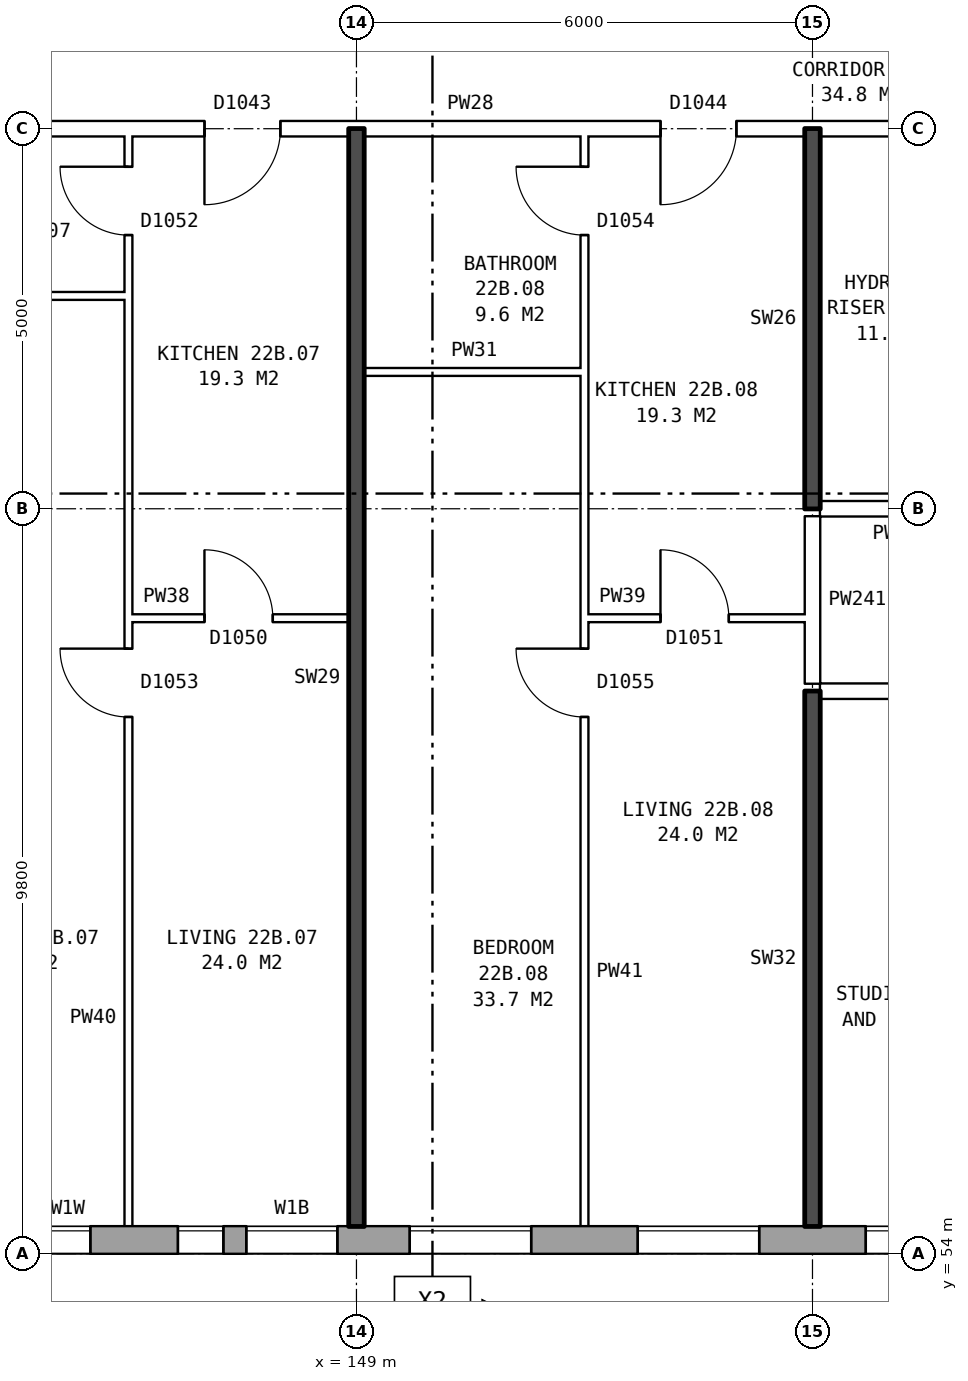
"""IFC4 building model, lengths in metres.
Left out: names, types, materials, properties, quantities, classifications, styles, units other than length and angle.
Written with IfcOpenShell. Run it as: python <this file> out.ifc"""

import sys

from ifc_helpers import new_model, si_unit, direction, frame, frame_2d, origin, place, context, subcontext, project, spatial, rectangle, extrude, element, fill, save


model = new_model("IFC4")
c1 = context("Model", 3, precision=1e-05, world=origin(), true_north=direction((0.0, 1.0)))
c2 = subcontext(c1, "Body", "Model", "MODEL_VIEW")
j1 = project(units=[si_unit("LENGTHUNIT", "METRE"), si_unit("PLANEANGLEUNIT", "RADIAN")], contexts=[c1])
p1 = place(None, origin())
s1 = spatial("IfcSite", under=j1, at=p1, CompositionType="ELEMENT")
p2 = place(p1, origin())
s2 = spatial("IfcBuilding", under=s1, at=p2, CompositionType="ELEMENT")
p3 = place(p2, frame((0.0, 0.0, 80.9)))
s3 = spatial("IfcBuildingStorey", under=s2, at=p3, CompositionType="ELEMENT", Elevation=80.9)
p4 = place(p3, frame((134.075, 54.18, 0.0), z_axis=(0.0, 0.0, 1.0), x_axis=(1.0, 0.0, 0.0)))
e1 = element("IfcWall", 1, at=p4, inside=s3, PredefinedType="STANDARD", context=c2, shape_type="SweptSolid", body=[
    extrude(rectangle(XDim=38.101, YDim=0.36, at=frame_2d((19.05, 0.0))), origin(), (0.0, 0.0, 1.0), 2.85),
])
p5 = place(p4, frame((0.625, 0.0, 0.8)))
e2 = element("IfcOpeningElement", 2, at=p5, cuts=e1, PredefinedType="OPENING", context=c2, shape_type="SweptSolid", body=[
    extrude(rectangle(XDim=1.6, YDim=1.8, at=frame_2d((0.8, 0.9))), frame((0.0, 0.19, 0.0), z_axis=(0.0, -1.0, 0.0), x_axis=(1.0, 0.0, 0.0)), (0.0, 0.0, 1.0), 0.38),
])
p6 = place(p4, frame((3.625, 0.0, 0.8)))
e3 = element("IfcOpeningElement", 3, at=p6, cuts=e1, PredefinedType="OPENING", context=c2, shape_type="SweptSolid", body=[
    extrude(rectangle(XDim=1.6, YDim=1.8, at=frame_2d((0.8, 0.9))), frame((0.0, 0.19, 0.0), z_axis=(0.0, -1.0, 0.0), x_axis=(1.0, 0.0, 0.0)), (0.0, 0.0, 1.0), 0.38),
])
p7 = place(p4, frame((6.625, 0.0, 0.8)))
e4 = element("IfcOpeningElement", 4, at=p7, cuts=e1, PredefinedType="OPENING", context=c2, shape_type="SweptSolid", body=[
    extrude(rectangle(XDim=1.6, YDim=1.8, at=frame_2d((0.8, 0.9))), frame((0.0, 0.19, 0.0), z_axis=(0.0, -1.0, 0.0), x_axis=(1.0, 0.0, 0.0)), (0.0, 0.0, 1.0), 0.38),
])
p8 = place(p4, frame((9.125, 0.0, 0.8)))
e5 = element("IfcOpeningElement", 5, at=p8, cuts=e1, PredefinedType="OPENING", context=c2, shape_type="SweptSolid", body=[
    extrude(rectangle(XDim=1.4, YDim=1.8, at=frame_2d((0.7, 0.9))), frame((0.0, 0.19, 0.0), z_axis=(0.0, -1.0, 0.0), x_axis=(1.0, 0.0, 0.0)), (0.0, 0.0, 1.0), 0.38),
])
p9 = place(p4, frame((12.575, 0.0, 0.8)))
e6 = element("IfcOpeningElement", 6, at=p9, cuts=e1, PredefinedType="OPENING", context=c2, shape_type="SweptSolid", body=[
    extrude(rectangle(XDim=0.6, YDim=0.9, at=frame_2d((0.3, 0.45))), frame((0.0, 0.19, 0.0), z_axis=(0.0, -1.0, 0.0), x_axis=(1.0, 0.0, 0.0)), (0.0, 0.0, 1.0), 0.38),
])
p10 = place(p4, frame((15.625, 0.0, 0.8)))
e7 = element("IfcOpeningElement", 7, at=p10, cuts=e1, PredefinedType="OPENING", context=c2, shape_type="SweptSolid", body=[
    extrude(rectangle(XDim=1.6, YDim=1.8, at=frame_2d((0.8, 0.9))), frame((0.0, 0.19, 0.0), z_axis=(0.0, -1.0, 0.0), x_axis=(1.0, 0.0, 0.0)), (0.0, 0.0, 1.0), 0.38),
])
p11 = place(p4, frame((18.625, 0.0, 0.8)))
e8 = element("IfcOpeningElement", 8, at=p11, cuts=e1, PredefinedType="OPENING", context=c2, shape_type="SweptSolid", body=[
    extrude(rectangle(XDim=1.6, YDim=1.8, at=frame_2d((0.8, 0.9))), frame((0.0, 0.19, 0.0), z_axis=(0.0, -1.0, 0.0), x_axis=(1.0, 0.0, 0.0)), (0.0, 0.0, 1.0), 0.38),
])
p12 = place(p4, frame((21.625, 0.0, 0.8)))
e9 = element("IfcOpeningElement", 9, at=p12, cuts=e1, PredefinedType="OPENING", context=c2, shape_type="SweptSolid", body=[
    extrude(rectangle(XDim=1.6, YDim=1.8, at=frame_2d((0.8, 0.9))), frame((0.0, 0.19, 0.0), z_axis=(0.0, -1.0, 0.0), x_axis=(1.0, 0.0, 0.0)), (0.0, 0.0, 1.0), 0.38),
])
p13 = place(p4, frame((23.525, 0.0, 0.8)))
e10 = element("IfcOpeningElement", 10, at=p13, cuts=e1, PredefinedType="OPENING", context=c2, shape_type="SweptSolid", body=[
    extrude(rectangle(XDim=1.0, YDim=1.8, at=frame_2d((0.5, 0.9))), frame((0.0, 0.19, 0.0), z_axis=(0.0, -1.0, 0.0), x_axis=(1.0, 0.0, 0.0)), (0.0, 0.0, 1.0), 0.38),
])
p14 = place(p4, frame((27.625, 0.0, 0.8)))
e11 = element("IfcOpeningElement", 11, at=p14, cuts=e1, PredefinedType="OPENING", context=c2, shape_type="SweptSolid", body=[
    extrude(rectangle(XDim=1.6, YDim=1.8, at=frame_2d((0.8, 0.9))), frame((0.0, 0.19, 0.0), z_axis=(0.0, -1.0, 0.0), x_axis=(1.0, 0.0, 0.0)), (0.0, 0.0, 1.0), 0.38),
])
p15 = place(p4, frame((30.625, 0.0, 0.8)))
e12 = element("IfcOpeningElement", 12, at=p15, cuts=e1, PredefinedType="OPENING", context=c2, shape_type="SweptSolid", body=[
    extrude(rectangle(XDim=1.6, YDim=1.8, at=frame_2d((0.8, 0.9))), frame((0.0, 0.19, 0.0), z_axis=(0.0, -1.0, 0.0), x_axis=(1.0, 0.0, 0.0)), (0.0, 0.0, 1.0), 0.38),
])
p16 = place(p4, frame((33.625, 0.0, 0.8)))
e13 = element("IfcOpeningElement", 13, at=p16, cuts=e1, PredefinedType="OPENING", context=c2, shape_type="SweptSolid", body=[
    extrude(rectangle(XDim=1.6, YDim=1.8, at=frame_2d((0.8, 0.9))), frame((0.0, 0.19, 0.0), z_axis=(0.0, -1.0, 0.0), x_axis=(1.0, 0.0, 0.0)), (0.0, 0.0, 1.0), 0.38),
])
p17 = place(p4, frame((10.825, 0.0, 1.7)))
e14 = element("IfcOpeningElement", 14, at=p17, cuts=e1, PredefinedType="OPENING", context=c2, shape_type="SweptSolid", body=[
    extrude(rectangle(XDim=0.6, YDim=0.9, at=frame_2d((0.3, 0.45))), frame((0.0, 0.19, 0.0), z_axis=(0.0, -1.0, 0.0), x_axis=(1.0, 0.0, 0.0)), (0.0, 0.0, 1.0), 0.38),
])
p18 = place(p4, frame((13.475, 0.0, 0.8)))
e15 = element("IfcOpeningElement", 15, at=p18, cuts=e1, PredefinedType="OPENING", context=c2, shape_type="SweptSolid", body=[
    extrude(rectangle(XDim=1.2, YDim=1.8, at=frame_2d((0.6, 0.9))), frame((0.0, 0.19, 0.0), z_axis=(0.0, -1.0, 0.0), x_axis=(1.0, 0.0, 0.0)), (0.0, 0.0, 1.0), 0.38),
])
p19 = place(p4, frame((24.825, 0.0, 0.8)))
e16 = element("IfcOpeningElement", 16, at=p19, cuts=e1, PredefinedType="OPENING", context=c2, shape_type="SweptSolid", body=[
    extrude(rectangle(XDim=0.6, YDim=0.9, at=frame_2d((0.3, 0.45))), frame((0.0, 0.19, 0.0), z_axis=(0.0, -1.0, 0.0), x_axis=(1.0, 0.0, 0.0)), (0.0, 0.0, 1.0), 0.38),
])
p20 = place(p3, frame((155.1, 61.4, 0.0), z_axis=(0.0, 0.0, 1.0), x_axis=(1.0, 0.0, 0.0)))
e17 = element("IfcWall", 17, at=p20, inside=s3, PredefinedType="PARTITIONING", context=c2, shape_type="SweptSolid", body=[
    extrude(rectangle(XDim=19.79, YDim=0.2, at=frame_2d((9.895, 0.0))), origin(), (0.0, 0.0, 1.0), 2.85),
])
p21 = place(p20, frame((1.45, 0.0, 0.0)))
e18 = element("IfcOpeningElement", 18, at=p21, cuts=e17, PredefinedType="OPENING", context=c2, shape_type="SweptSolid", body=[
    extrude(rectangle(XDim=1.0, YDim=2.1, at=frame_2d((0.5, 1.05))), frame((0.0, 0.11, 0.0), z_axis=(0.0, -1.0, 0.0), x_axis=(1.0, 0.0, 0.0)), (0.0, 0.0, 1.0), 0.22),
])
p22 = place(p20, frame((7.4, 0.0, 0.0)))
e19 = element("IfcOpeningElement", 19, at=p22, cuts=e17, PredefinedType="OPENING", context=c2, shape_type="SweptSolid", body=[
    extrude(rectangle(XDim=1.0, YDim=2.1, at=frame_2d((0.5, 1.05))), frame((0.0, 0.11, 0.0), z_axis=(0.0, -1.0, 0.0), x_axis=(1.0, 0.0, 0.0)), (0.0, 0.0, 1.0), 0.22),
])
p23 = place(p20, frame((13.2, 0.0, 0.0)))
e20 = element("IfcOpeningElement", 20, at=p23, cuts=e17, PredefinedType="OPENING", context=c2, shape_type="SweptSolid", body=[
    extrude(rectangle(XDim=1.0, YDim=2.1, at=frame_2d((0.5, 1.05))), frame((0.0, 0.11, 0.0), z_axis=(0.0, -1.0, 0.0), x_axis=(1.0, 0.0, 0.0)), (0.0, 0.0, 1.0), 0.22),
])
p24 = place(p3, frame((146.0, 62.36, 0.0), z_axis=(0.0, 0.0, 1.0), x_axis=(1.0, 0.0, 0.0)))
e21 = element("IfcWall", 21, at=p24, inside=s3, PredefinedType="PARTITIONING", context=c2, shape_type="SweptSolid", body=[
    extrude(rectangle(XDim=2.9, YDim=0.1, at=frame_2d((1.45, 0.0))), origin(), (0.0, 0.0, 1.0), 2.85),
])
p25 = place(p24, frame((1.0, 0.0, 0.0)))
e22 = element("IfcOpeningElement", 22, at=p25, cuts=e21, PredefinedType="OPENING", context=c2, shape_type="SweptSolid", body=[
    extrude(rectangle(XDim=0.9, YDim=2.1, at=frame_2d((0.45, 1.05))), frame((0.0, 0.06, 0.0), z_axis=(0.0, -1.0, 0.0), x_axis=(1.0, 0.0, 0.0)), (0.0, 0.0, 1.0), 0.12),
])
p26 = place(p3, frame((152.0, 62.36, 0.0), z_axis=(0.0, 0.0, 1.0), x_axis=(1.0, 0.0, 0.0)))
e23 = element("IfcWall", 23, at=p26, inside=s3, PredefinedType="PARTITIONING", context=c2, shape_type="SweptSolid", body=[
    extrude(rectangle(XDim=2.9, YDim=0.1, at=frame_2d((1.45, 0.0))), origin(), (0.0, 0.0, 1.0), 2.85),
])
p27 = place(p26, frame((1.0, 0.0, 0.0)))
e24 = element("IfcOpeningElement", 24, at=p27, cuts=e23, PredefinedType="OPENING", context=c2, shape_type="SweptSolid", body=[
    extrude(rectangle(XDim=0.9, YDim=2.1, at=frame_2d((0.45, 1.05))), frame((0.0, 0.06, 0.0), z_axis=(0.0, -1.0, 0.0), x_axis=(1.0, 0.0, 0.0)), (0.0, 0.0, 1.0), 0.12),
])
p28 = place(p3, frame((155.1, 63.8, 0.0), z_axis=(0.0, 0.0, 1.0), x_axis=(1.0, 0.0, 0.0)))
e25 = element("IfcWall", 25, at=p28, inside=s3, PredefinedType="PARTITIONING", context=c2, shape_type="SweptSolid", body=[
    extrude(rectangle(XDim=2.14, YDim=0.2, at=frame_2d((1.07, 0.0))), origin(), (0.0, 0.0, 1.0), 2.85),
])
p29 = place(p3, frame((149.1, 65.6, 0.0), z_axis=(0.0, 0.0, 1.0), x_axis=(1.0, 0.0, 0.0)))
e26 = element("IfcWall", 26, at=p29, inside=s3, PredefinedType="PARTITIONING", context=c2, shape_type="SweptSolid", body=[
    extrude(rectangle(XDim=2.9, YDim=0.1, at=frame_2d((1.45, 0.0))), origin(), (0.0, 0.0, 1.0), 2.85),
])
p30 = place(p3, frame((142.76, 66.6, 0.0), z_axis=(0.0, 0.0, 1.0), x_axis=(1.0, 0.0, 0.0)))
e27 = element("IfcWall", 27, at=p30, inside=s3, PredefinedType="PARTITIONING", context=c2, shape_type="SweptSolid", body=[
    extrude(rectangle(XDim=3.24, YDim=0.1, at=frame_2d((1.62, 0.0))), origin(), (0.0, 0.0, 1.0), 2.85),
])
p31 = place(p3, frame((142.76, 68.8, 0.0), z_axis=(0.0, 0.0, 1.0), x_axis=(1.0, 0.0, 0.0)))
e28 = element("IfcWall", 28, at=p31, inside=s3, PredefinedType="PARTITIONING", context=c2, shape_type="SweptSolid", body=[
    extrude(rectangle(XDim=14.48, YDim=0.2, at=frame_2d((7.24, 0.0))), origin(), (0.0, 0.0, 1.0), 2.85),
])
p32 = place(p31, frame((4.24, 0.0, 0.0)))
e29 = element("IfcOpeningElement", 29, at=p32, cuts=e28, PredefinedType="OPENING", context=c2, shape_type="SweptSolid", body=[
    extrude(rectangle(XDim=1.0, YDim=2.1, at=frame_2d((0.5, 1.05))), frame((0.0, 0.11, 0.0), z_axis=(0.0, -1.0, 0.0), x_axis=(1.0, 0.0, 0.0)), (0.0, 0.0, 1.0), 0.22),
])
p33 = place(p31, frame((10.24, 0.0, 0.0)))
e30 = element("IfcOpeningElement", 30, at=p33, cuts=e28, PredefinedType="OPENING", context=c2, shape_type="SweptSolid", body=[
    extrude(rectangle(XDim=1.0, YDim=2.1, at=frame_2d((0.5, 1.05))), frame((0.0, 0.11, 0.0), z_axis=(0.0, -1.0, 0.0), x_axis=(1.0, 0.0, 0.0)), (0.0, 0.0, 1.0), 0.22),
])
p34 = place(p3, frame((146.0, 54.36, 0.0), z_axis=(0.0, 0.0, 1.0), x_axis=(0.0, 1.0, 0.0)))
e31 = element("IfcWall", 31, at=p34, inside=s3, PredefinedType="PARTITIONING", context=c2, shape_type="SweptSolid", body=[
    extrude(rectangle(XDim=14.34, YDim=0.1, at=frame_2d((7.17, 0.0))), origin(), (0.0, 0.0, 1.0), 2.85),
])
p35 = place(p34, frame((6.7, 0.0, 0.0)))
e32 = element("IfcOpeningElement", 32, at=p35, cuts=e31, PredefinedType="OPENING", context=c2, shape_type="SweptSolid", body=[
    extrude(rectangle(XDim=0.9, YDim=2.1, at=frame_2d((0.45, 1.05))), frame((0.0, 0.06, 0.0), z_axis=(0.0, -1.0, 0.0), x_axis=(1.0, 0.0, 0.0)), (0.0, 0.0, 1.0), 0.12),
])
p36 = place(p34, frame((13.04, 0.0, 0.0)))
e33 = element("IfcOpeningElement", 33, at=p36, cuts=e31, PredefinedType="OPENING", context=c2, shape_type="SweptSolid", body=[
    extrude(rectangle(XDim=0.9, YDim=2.1, at=frame_2d((0.45, 1.05))), frame((0.0, 0.06, 0.0), z_axis=(0.0, -1.0, 0.0), x_axis=(1.0, 0.0, 0.0)), (0.0, 0.0, 1.0), 0.12),
])
p37 = place(p3, frame((149.0, 54.36, 0.0), z_axis=(0.0, 0.0, 1.0), x_axis=(0.0, 1.0, 0.0)))
e34 = element("IfcWall", 34, at=p37, inside=s3, PredefinedType="SOLIDWALL", context=c2, shape_type="SweptSolid", body=[
    extrude(rectangle(XDim=14.44, YDim=0.2, at=frame_2d((7.22, 0.0))), origin(), (0.0, 0.0, 1.0), 2.85),
])
p38 = place(p3, frame((152.0, 54.36, 0.0), z_axis=(0.0, 0.0, 1.0), x_axis=(0.0, 1.0, 0.0)))
e35 = element("IfcWall", 35, at=p38, inside=s3, PredefinedType="PARTITIONING", context=c2, shape_type="SweptSolid", body=[
    extrude(rectangle(XDim=14.34, YDim=0.1, at=frame_2d((7.17, 0.0))), origin(), (0.0, 0.0, 1.0), 2.85),
])
p39 = place(p38, frame((6.7, 0.0, 0.0)))
e36 = element("IfcOpeningElement", 36, at=p39, cuts=e35, PredefinedType="OPENING", context=c2, shape_type="SweptSolid", body=[
    extrude(rectangle(XDim=0.9, YDim=2.1, at=frame_2d((0.45, 1.05))), frame((0.0, 0.06, 0.0), z_axis=(0.0, -1.0, 0.0), x_axis=(1.0, 0.0, 0.0)), (0.0, 0.0, 1.0), 0.12),
])
p40 = place(p38, frame((13.04, 0.0, 0.0)))
e37 = element("IfcOpeningElement", 37, at=p40, cuts=e35, PredefinedType="OPENING", context=c2, shape_type="SweptSolid", body=[
    extrude(rectangle(XDim=0.9, YDim=2.1, at=frame_2d((0.45, 1.05))), frame((0.0, 0.06, 0.0), z_axis=(0.0, -1.0, 0.0), x_axis=(1.0, 0.0, 0.0)), (0.0, 0.0, 1.0), 0.12),
])
p41 = place(p3, frame((155.0, 54.36, 0.0), z_axis=(0.0, 0.0, 1.0), x_axis=(0.0, 1.0, 0.0)))
e38 = element("IfcWall", 38, at=p41, inside=s3, PredefinedType="SOLIDWALL", context=c2, shape_type="SweptSolid", body=[
    extrude(rectangle(XDim=7.04, YDim=0.2, at=frame_2d((3.52, 0.0))), origin(), (0.0, 0.0, 1.0), 2.85),
])
p42 = place(p3, frame((155.0, 61.5, 0.0), z_axis=(0.0, 0.0, 1.0), x_axis=(0.0, 1.0, 0.0)))
e39 = element("IfcWall", 39, at=p42, inside=s3, PredefinedType="PARTITIONING", context=c2, shape_type="SweptSolid", body=[
    extrude(rectangle(XDim=2.2, YDim=0.2, at=frame_2d((1.1, 0.0))), origin(), (0.0, 0.0, 1.0), 2.85),
])
p43 = place(p3, frame((155.0, 63.8, 0.0), z_axis=(0.0, 0.0, 1.0), x_axis=(0.0, 1.0, 0.0)))
e40 = element("IfcWall", 40, at=p43, inside=s3, PredefinedType="SOLIDWALL", context=c2, shape_type="SweptSolid", body=[
    extrude(rectangle(XDim=5.0, YDim=0.2, at=frame_2d((2.5, 0.0))), origin(), (0.0, 0.0, 1.0), 2.85),
])
p44 = place(p9, origin())
e41 = element("IfcWindow", 41, at=p44, inside=s3, PartitioningType="SINGLE_PANEL", PredefinedType="WINDOW", context=c2, shape_type="SweptSolid", body=[
    extrude(rectangle(XDim=0.6, YDim=0.9, at=frame_2d((0.3, 0.45))), frame((0.0, 0.15, 0.0), z_axis=(0.0, -1.0, 0.0), x_axis=(1.0, 0.0, 0.0)), (0.0, 0.0, 1.0), 0.06),
])
fill(e6, e41)
p45 = place(p10, origin())
e42 = element("IfcWindow", 42, at=p45, inside=s3, PartitioningType="SINGLE_PANEL", PredefinedType="WINDOW", context=c2, shape_type="SweptSolid", body=[
    extrude(rectangle(XDim=1.6, YDim=1.8, at=frame_2d((0.8, 0.9))), frame((0.0, 0.15, 0.0), z_axis=(0.0, -1.0, 0.0), x_axis=(1.0, 0.0, 0.0)), (0.0, 0.0, 1.0), 0.06),
])
fill(e7, e42)
p46 = place(p11, origin())
e43 = element("IfcWindow", 43, at=p46, inside=s3, PartitioningType="SINGLE_PANEL", PredefinedType="WINDOW", context=c2, shape_type="SweptSolid", body=[
    extrude(rectangle(XDim=1.6, YDim=1.8, at=frame_2d((0.8, 0.9))), frame((0.0, 0.15, 0.0), z_axis=(0.0, -1.0, 0.0), x_axis=(1.0, 0.0, 0.0)), (0.0, 0.0, 1.0), 0.06),
])
fill(e8, e43)
p47 = place(p12, origin())
e44 = element("IfcWindow", 44, at=p47, inside=s3, PartitioningType="SINGLE_PANEL", PredefinedType="WINDOW", context=c2, shape_type="SweptSolid", body=[
    extrude(rectangle(XDim=1.6, YDim=1.8, at=frame_2d((0.8, 0.9))), frame((0.0, 0.15, 0.0), z_axis=(0.0, -1.0, 0.0), x_axis=(1.0, 0.0, 0.0)), (0.0, 0.0, 1.0), 0.06),
])
fill(e9, e44)
p48 = place(p35, origin())
e45 = element("IfcDoor", 45, at=p48, inside=s3, OperationType="SINGLE_SWING_RIGHT", PredefinedType="DOOR", context=c2, shape_type="SweptSolid", body=[
    extrude(rectangle(XDim=0.9, YDim=2.1, at=frame_2d((0.45, 1.05))), frame((0.0, 0.025, 0.0), z_axis=(0.0, -1.0, 0.0), x_axis=(1.0, 0.0, 0.0)), (0.0, 0.0, 1.0), 0.05),
])
fill(e32, e45)
p49 = place(p32, frame((1.0, 0.0, 0.0), z_axis=(0.0, 0.0, 1.0), x_axis=(-1.0, 0.0, 0.0)))
e46 = element("IfcDoor", 46, at=p49, inside=s3, OperationType="SINGLE_SWING_RIGHT", PredefinedType="DOOR", context=c2, shape_type="SweptSolid", body=[
    extrude(rectangle(XDim=1.0, YDim=2.1, at=frame_2d((0.5, 1.05))), frame((0.0, 0.025, 0.0), z_axis=(0.0, -1.0, 0.0), x_axis=(1.0, 0.0, 0.0)), (0.0, 0.0, 1.0), 0.05),
])
fill(e29, e46)
p50 = place(p25, origin())
e47 = element("IfcDoor", 47, at=p50, inside=s3, OperationType="SINGLE_SWING_LEFT", PredefinedType="DOOR", context=c2, shape_type="SweptSolid", body=[
    extrude(rectangle(XDim=0.9, YDim=2.1, at=frame_2d((0.45, 1.05))), frame((0.0, 0.025, 0.0), z_axis=(0.0, -1.0, 0.0), x_axis=(1.0, 0.0, 0.0)), (0.0, 0.0, 1.0), 0.05),
])
fill(e22, e47)
p51 = place(p36, origin())
e48 = element("IfcDoor", 48, at=p51, inside=s3, OperationType="SINGLE_SWING_RIGHT", PredefinedType="DOOR", context=c2, shape_type="SweptSolid", body=[
    extrude(rectangle(XDim=0.9, YDim=2.1, at=frame_2d((0.45, 1.05))), frame((0.0, 0.025, 0.0), z_axis=(0.0, -1.0, 0.0), x_axis=(1.0, 0.0, 0.0)), (0.0, 0.0, 1.0), 0.05),
])
fill(e33, e48)
p52 = place(p39, origin())
e49 = element("IfcDoor", 49, at=p52, inside=s3, OperationType="SINGLE_SWING_RIGHT", PredefinedType="DOOR", context=c2, shape_type="SweptSolid", body=[
    extrude(rectangle(XDim=0.9, YDim=2.1, at=frame_2d((0.45, 1.05))), frame((0.0, 0.025, 0.0), z_axis=(0.0, -1.0, 0.0), x_axis=(1.0, 0.0, 0.0)), (0.0, 0.0, 1.0), 0.05),
])
fill(e36, e49)
p53 = place(p33, frame((1.0, 0.0, 0.0), z_axis=(0.0, 0.0, 1.0), x_axis=(-1.0, 0.0, 0.0)))
e50 = element("IfcDoor", 50, at=p53, inside=s3, OperationType="SINGLE_SWING_RIGHT", PredefinedType="DOOR", context=c2, shape_type="SweptSolid", body=[
    extrude(rectangle(XDim=1.0, YDim=2.1, at=frame_2d((0.5, 1.05))), frame((0.0, 0.025, 0.0), z_axis=(0.0, -1.0, 0.0), x_axis=(1.0, 0.0, 0.0)), (0.0, 0.0, 1.0), 0.05),
])
fill(e30, e50)
p54 = place(p27, origin())
e51 = element("IfcDoor", 51, at=p54, inside=s3, OperationType="SINGLE_SWING_LEFT", PredefinedType="DOOR", context=c2, shape_type="SweptSolid", body=[
    extrude(rectangle(XDim=0.9, YDim=2.1, at=frame_2d((0.45, 1.05))), frame((0.0, 0.025, 0.0), z_axis=(0.0, -1.0, 0.0), x_axis=(1.0, 0.0, 0.0)), (0.0, 0.0, 1.0), 0.05),
])
fill(e24, e51)
p55 = place(p40, origin())
e52 = element("IfcDoor", 52, at=p55, inside=s3, OperationType="SINGLE_SWING_RIGHT", PredefinedType="DOOR", context=c2, shape_type="SweptSolid", body=[
    extrude(rectangle(XDim=0.9, YDim=2.1, at=frame_2d((0.45, 1.05))), frame((0.0, 0.025, 0.0), z_axis=(0.0, -1.0, 0.0), x_axis=(1.0, 0.0, 0.0)), (0.0, 0.0, 1.0), 0.05),
])
fill(e37, e52)
p56 = place(p17, origin())
e53 = element("IfcWindow", 53, at=p56, inside=s3, PartitioningType="SINGLE_PANEL", PredefinedType="WINDOW", context=c2, shape_type="SweptSolid", body=[
    extrude(rectangle(XDim=0.6, YDim=0.9, at=frame_2d((0.3, 0.45))), frame((0.0, 0.15, 0.0), z_axis=(0.0, -1.0, 0.0), x_axis=(1.0, 0.0, 0.0)), (0.0, 0.0, 1.0), 0.06),
])
fill(e14, e53)
p57 = place(p18, origin())
e54 = element("IfcWindow", 54, at=p57, inside=s3, PartitioningType="SINGLE_PANEL", PredefinedType="WINDOW", context=c2, shape_type="SweptSolid", body=[
    extrude(rectangle(XDim=1.2, YDim=1.8, at=frame_2d((0.6, 0.9))), frame((0.0, 0.15, 0.0), z_axis=(0.0, -1.0, 0.0), x_axis=(1.0, 0.0, 0.0)), (0.0, 0.0, 1.0), 0.06),
])
fill(e15, e54)
save(model, sys.argv[1])
